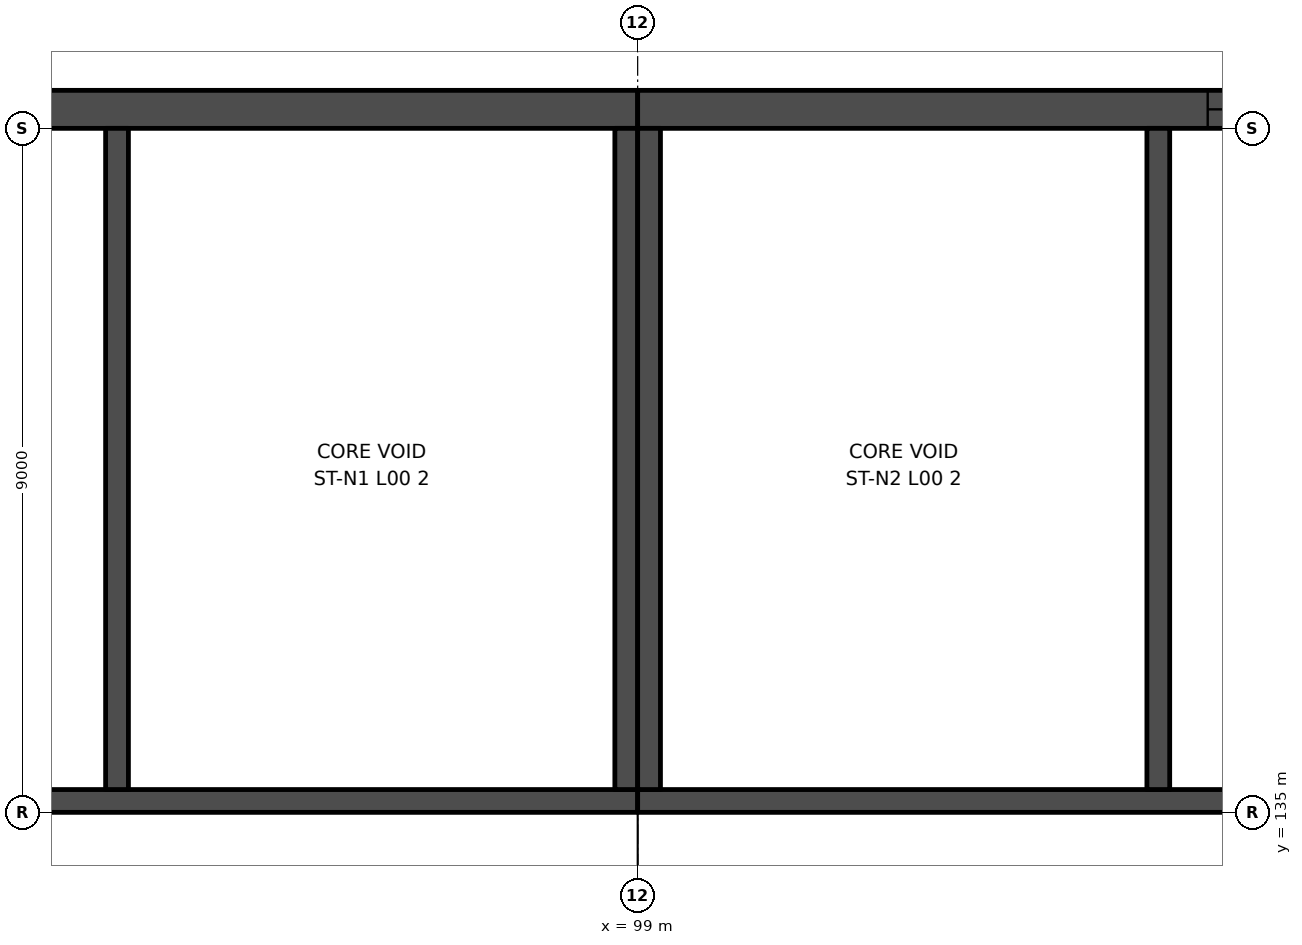
"""IFC4 building model, lengths in metres.
Left out: names, types, materials, properties, quantities, classifications, styles, units other than length and angle.
Written with IfcOpenShell. Run it as: python <this file> out.ifc"""

import sys

from ifc_helpers import new_model, si_unit, direction, frame, frame_2d, origin, place, context, subcontext, project, spatial, rectangle, extrude, element, fill, save


model = new_model("IFC4")
c1 = context("Model", 3, precision=1e-05, world=origin(), true_north=direction((0.0, 1.0)))
c2 = subcontext(c1, "Body", "Model", "MODEL_VIEW")
j1 = project(units=[si_unit("LENGTHUNIT", "METRE"), si_unit("PLANEANGLEUNIT", "RADIAN")], contexts=[c1])
p1 = place(None, origin())
s1 = spatial("IfcSite", under=j1, at=p1, CompositionType="ELEMENT")
p2 = place(p1, origin())
s2 = spatial("IfcBuilding", under=s1, at=p2, CompositionType="ELEMENT")
p3 = place(p2, origin())
s3 = spatial("IfcBuildingStorey", under=s2, at=p3, CompositionType="ELEMENT", Elevation=0.0)
p4 = place(p3, frame((81.0, 135.15, 0.0), z_axis=(0.0, 0.0, 1.0), x_axis=(1.0, 0.0, 0.0)))
e1 = element("IfcWall", 1, at=p4, inside=s3, PredefinedType="SHEAR", context=c2, shape_type="SweptSolid", body=[
    extrude(rectangle(XDim=18.0, YDim=0.3, at=frame_2d((9.0, 0.0))), origin(), (0.0, 0.0, 1.0), 7.0),
])
p5 = place(p4, frame((1.5, 0.0, 0.0)))
e2 = element("IfcOpeningElement", 2, at=p5, cuts=e1, PredefinedType="OPENING", context=c2, shape_type="SweptSolid", body=[
    extrude(rectangle(XDim=1.2, YDim=2.1, at=frame_2d((0.6, 1.05))), frame((0.0, 0.16, 0.0), z_axis=(0.0, -1.0, 0.0), x_axis=(1.0, 0.0, 0.0)), (0.0, 0.0, 1.0), 0.32),
])
p6 = place(p3, frame((81.0, 144.25, 0.0), z_axis=(0.0, 0.0, 1.0), x_axis=(1.0, 0.0, 0.0)))
e3 = element("IfcWall", 3, at=p6, inside=s3, PredefinedType="SHEAR", context=c2, shape_type="SweptSolid", body=[
    extrude(rectangle(XDim=18.0, YDim=0.5, at=frame_2d((9.0, 0.0))), origin(), (0.0, 0.0, 1.0), 7.0),
])
p7 = place(p6, frame((0.8, 0.0, 0.0)))
e4 = element("IfcOpeningElement", 4, at=p7, cuts=e3, PredefinedType="OPENING", context=c2, shape_type="SweptSolid", body=[
    extrude(rectangle(XDim=2.6, YDim=2.4, at=frame_2d((1.3, 1.2))), frame((0.0, 0.26, 0.0), z_axis=(0.0, -1.0, 0.0), x_axis=(1.0, 0.0, 0.0)), (0.0, 0.0, 1.0), 0.52),
])
for number, where, z_axis, x_axis in (
    (5, (98.85, 135.3, 0.0), (0.0, 0.0, 1.0), (0.0, 1.0, 0.0)),
    (6, (92.15, 135.3, 0.0), (0.0, 0.0, 1.0), (0.0, 1.0, 0.0)),
):
    element("IfcWall", number, at=place(p3, frame(where, z_axis=z_axis, x_axis=x_axis)), inside=s3, PredefinedType="SHEAR", context=c2, shape_type="SweptSolid", body=[
        extrude(rectangle(XDim=8.7, YDim=0.3, at=frame_2d((4.35, 0.0))), origin(), (0.0, 0.0, 1.0), 7.0),
    ])
p8 = place(p3, frame((117.0, 135.15, 0.0), z_axis=(0.0, 0.0, 1.0), x_axis=(-1.0, 0.0, 0.0)))
e7 = element("IfcWall", 7, at=p8, inside=s3, PredefinedType="SHEAR", context=c2, shape_type="SweptSolid", body=[
    extrude(rectangle(XDim=18.0, YDim=0.3, at=frame_2d((9.0, 0.0))), origin(), (0.0, 0.0, 1.0), 7.0),
])
p9 = place(p8, frame((8.6, 0.0, 0.0)))
e8 = element("IfcOpeningElement", 8, at=p9, cuts=e7, PredefinedType="OPENING", context=c2, shape_type="SweptSolid", body=[
    extrude(rectangle(XDim=1.2, YDim=2.1, at=frame_2d((0.6, 1.05))), frame((0.0, 0.16, 0.0), z_axis=(0.0, -1.0, 0.0), x_axis=(1.0, 0.0, 0.0)), (0.0, 0.0, 1.0), 0.32),
])
p10 = place(p3, frame((117.0, 144.25, 0.0), z_axis=(0.0, 0.0, 1.0), x_axis=(-1.0, 0.0, 0.0)))
e9 = element("IfcWall", 9, at=p10, inside=s3, PredefinedType="SHEAR", context=c2, shape_type="SweptSolid", body=[
    extrude(rectangle(XDim=18.0, YDim=0.5, at=frame_2d((9.0, 0.0))), origin(), (0.0, 0.0, 1.0), 7.0),
])
p11 = place(p10, frame((7.9, 0.0, 0.0)))
e10 = element("IfcOpeningElement", 10, at=p11, cuts=e9, PredefinedType="OPENING", context=c2, shape_type="SweptSolid", body=[
    extrude(rectangle(XDim=2.6, YDim=2.4, at=frame_2d((1.3, 1.2))), frame((0.0, 0.26, 0.0), z_axis=(0.0, -1.0, 0.0), x_axis=(1.0, 0.0, 0.0)), (0.0, 0.0, 1.0), 0.52),
])
for number, where, z_axis, x_axis in (
    (11, (99.15, 135.3, 0.0), (0.0, 0.0, 1.0), (0.0, 1.0, 0.0)),
    (12, (105.85, 135.3, 0.0), (0.0, 0.0, 1.0), (0.0, 1.0, 0.0)),
):
    element("IfcWall", number, at=place(p3, frame(where, z_axis=z_axis, x_axis=x_axis)), inside=s3, PredefinedType="SHEAR", context=c2, shape_type="SweptSolid", body=[
        extrude(rectangle(XDim=8.7, YDim=0.3, at=frame_2d((4.35, 0.0))), origin(), (0.0, 0.0, 1.0), 7.0),
    ])
p12 = place(p11, frame((2.6, 0.0, 0.0), z_axis=(0.0, 0.0, 1.0), x_axis=(-1.0, 0.0, 0.0)))
e13 = element("IfcDoor", 13, at=p12, inside=s3, OperationType="DOUBLE_DOOR_SINGLE_SWING", PredefinedType="DOOR", context=c2, shape_type="SweptSolid", body=[
    extrude(rectangle(XDim=2.6, YDim=2.4, at=frame_2d((1.3, 1.2))), frame((0.0, 0.025, 0.0), z_axis=(0.0, -1.0, 0.0), x_axis=(1.0, 0.0, 0.0)), (0.0, 0.0, 1.0), 0.05),
])
fill(e10, e13)
save(model, sys.argv[1])
